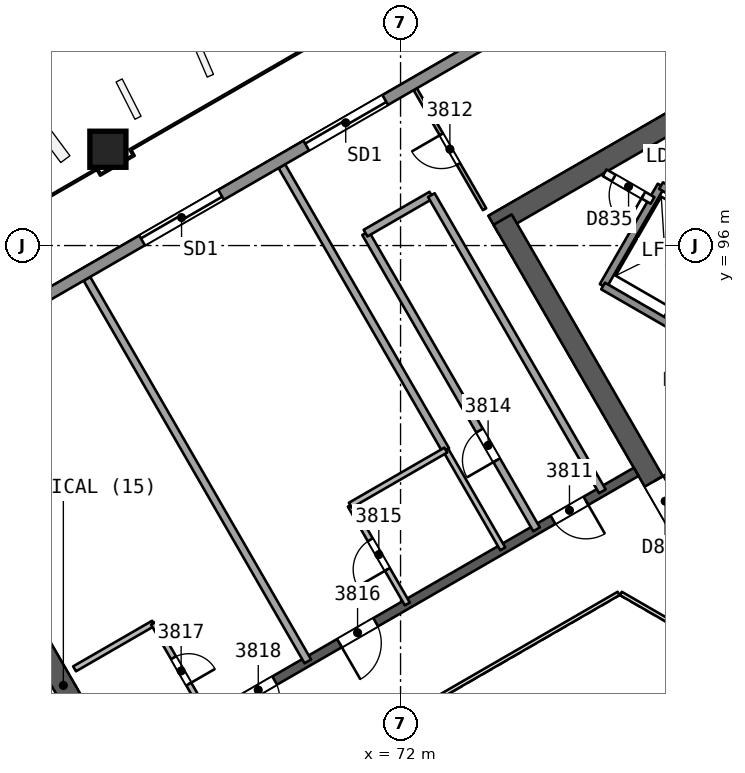
"""IFC4 building model, lengths in metres.
Left out: names, types, materials, properties, quantities, classifications, styles, units other than length and angle.
Written with IfcOpenShell. Run it as: python <this file> out.ifc"""

import sys

from ifc_helpers import new_model, si_unit, direction, frame, frame_2d, origin, origin_2d, place, context, subcontext, project, spatial, rectangle, extrude, element, fill, save


model = new_model("IFC4")
c1 = context("Model", 3, precision=1e-05, world=origin(), true_north=direction((0.0, 1.0)))
c2 = subcontext(c1, "Body", "Model", "MODEL_VIEW")
j1 = project(units=[si_unit("LENGTHUNIT", "METRE"), si_unit("PLANEANGLEUNIT", "RADIAN")], contexts=[c1])
p1 = place(None, origin())
s1 = spatial("IfcSite", under=j1, at=p1, CompositionType="ELEMENT")
p2 = place(p1, origin())
s2 = spatial("IfcBuilding", under=s1, at=p2, CompositionType="ELEMENT")
p3 = place(p2, frame((0.0, 0.0, 160.0)))
s3 = spatial("IfcBuildingStorey", under=s2, at=p3, CompositionType="ELEMENT", Elevation=160.0)
p4 = place(p3, frame((65.682, 80.0, 0.0), z_axis=(0.0, 0.0, 1.0), x_axis=(-0.500000202252, 0.866025287014, 0.0)))
e1 = element("IfcWall", 1, at=p4, inside=s3, PredefinedType="SHEAR", context=c2, shape_type="SweptSolid", body=[
    extrude(rectangle(XDim=10.221, YDim=0.55, at=frame_2d((5.111, 0.0))), origin(), (0.0, 0.0, 1.0), 3.7),
])
p5 = place(p4, frame((0.791, 0.0, 0.0)))
e2 = element("IfcOpeningElement", 2, at=p5, cuts=e1, PredefinedType="OPENING", context=c2, shape_type="SweptSolid", body=[
    extrude(rectangle(XDim=1.2, YDim=2.1, at=frame_2d((0.6, 1.05))), frame((0.0, 0.286, 0.0), z_axis=(0.0, -1.0, 0.0), x_axis=(1.0, 0.0, 0.0)), (0.0, 0.0, 1.0), 0.571),
])
p6 = place(p3, frame((86.723, 103.633, 0.0), z_axis=(0.0, 0.0, 1.0), x_axis=(-0.866023530946, -0.500003243837, 0.0)))
e3 = element("IfcWall", 3, at=p6, inside=s3, PredefinedType="SHEAR", context=c2, shape_type="SweptSolid", body=[
    extrude(rectangle(XDim=14.175, YDim=0.55, at=frame_2d((7.087, 0.0))), origin(), (0.0, 0.0, 1.0), 3.7),
])
p7 = place(p3, frame((74.686, 96.683, 0.0), z_axis=(0.0, 0.0, 1.0), x_axis=(0.499997818338, -0.866026663364, 0.0)))
e4 = element("IfcWall", 4, at=p7, inside=s3, PredefinedType="SHEAR", context=c2, shape_type="SweptSolid", body=[
    extrude(rectangle(XDim=10.105, YDim=0.55, at=frame_2d((5.052, 0.0))), origin(), (0.0, 0.0, 1.0), 3.7),
])
p8 = place(p7, frame((7.955, 0.0, 0.0)))
e5 = element("IfcOpeningElement", 5, at=p8, cuts=e4, PredefinedType="OPENING", context=c2, shape_type="SweptSolid", body=[
    extrude(rectangle(XDim=1.2, YDim=2.1, at=frame_2d((0.6, 1.05))), frame((0.0, 0.286, 0.0), z_axis=(0.0, -1.0, 0.0), x_axis=(1.0, 0.0, 0.0)), (0.0, 0.0, 1.0), 0.571),
])
p9 = place(p3, frame((78.2, 90.046, 0.0), z_axis=(0.0, 0.0, 1.0), x_axis=(-0.866026492143, -0.499998114903, 0.0)))
e6 = element("IfcWall", 6, at=p9, inside=s3, PredefinedType="SHEAR", context=c2, shape_type="SweptSolid", body=[
    extrude(rectangle(XDim=15.588, YDim=0.25, at=frame_2d((7.794, 0.0))), origin(), (0.0, 0.0, 1.0), 3.25),
])
p10 = place(p9, frame((1.527, 0.0, 0.0)))
e7 = element("IfcOpeningElement", 7, at=p10, cuts=e6, PredefinedType="OPENING", context=c2, shape_type="SweptSolid", body=[
    extrude(rectangle(XDim=1.0, YDim=2.1, at=frame_2d((0.5, 1.05))), frame((0.0, 0.135, 0.0), z_axis=(0.0, -1.0, 0.0), x_axis=(1.0, 0.0, 0.0)), (0.0, 0.0, 1.0), 0.271),
])
p11 = place(p9, frame((7.915, 0.0, 0.0)))
e8 = element("IfcOpeningElement", 8, at=p11, cuts=e6, PredefinedType="OPENING", context=c2, shape_type="SweptSolid", body=[
    extrude(rectangle(XDim=1.1, YDim=2.1, at=frame_2d((0.55, 1.05))), frame((0.0, 0.135, 0.0), z_axis=(0.0, -1.0, 0.0), x_axis=(1.0, 0.0, 0.0)), (0.0, 0.0, 1.0), 0.271),
])
p12 = place(p9, frame((10.982, 0.0, 0.0)))
e9 = element("IfcOpeningElement", 9, at=p12, cuts=e6, PredefinedType="OPENING", context=c2, shape_type="SweptSolid", body=[
    extrude(rectangle(XDim=1.0, YDim=2.1, at=frame_2d((0.5, 1.05))), frame((0.0, 0.135, 0.0), z_axis=(0.0, -1.0, 0.0), x_axis=(1.0, 0.0, 0.0)), (0.0, 0.0, 1.0), 0.271),
])
p13 = place(p3, frame((64.287, 98.555, 0.0), z_axis=(0.010093620709, -0.017482414954, 0.999796221231), x_axis=(-0.499897086036, 0.865849517735, 0.020187025824)))
e10 = element("IfcColumn", 10, at=p13, inside=s3, PredefinedType="COLUMN", context=c2, shape_type="SweptSolid", body=[
    extrude(rectangle(XDim=0.95, YDim=0.95, at=origin_2d()), origin(), (0.0, 0.0, 1.0), 3.701),
])
p14 = place(p3, frame((74.21, 96.956, 0.0), z_axis=(0.0, 0.0, 1.0), x_axis=(-0.499983176524, 0.866035116605, 0.0)))
e11 = element("IfcWall", 11, at=p14, inside=s3, PredefinedType="PARTITIONING", context=c2, shape_type="SweptSolid", body=[
    extrude(rectangle(XDim=3.648, YDim=0.1, at=frame_2d((1.824, 0.0))), origin(), (0.0, 0.0, 1.0), 3.25),
])
p15 = place(p14, frame((1.374, 0.0, 0.0)))
e12 = element("IfcOpeningElement", 12, at=p15, cuts=e11, PredefinedType="OPENING", context=c2, shape_type="SweptSolid", body=[
    extrude(rectangle(XDim=0.9, YDim=2.1, at=frame_2d((0.45, 1.05))), frame((0.0, 0.061, 0.0), z_axis=(0.0, -1.0, 0.0), x_axis=(1.0, 0.0, 0.0)), (0.0, 0.0, 1.0), 0.121),
])
p16 = place(p3, frame((75.579, 88.533, 0.0), z_axis=(0.0, 0.0, 1.0), x_axis=(-0.5000018851, 0.866024315419, 0.0)))
e13 = element("IfcWall", 13, at=p16, inside=s3, PredefinedType="PARTITIONING", context=c2, shape_type="SweptSolid", body=[
    extrude(rectangle(XDim=9.0, YDim=0.2, at=frame_2d((4.5, 0.0))), origin(), (0.0, 0.0, 1.0), 3.25),
])
p17 = place(p16, frame((2.1, 0.0, 0.0)))
e14 = element("IfcOpeningElement", 14, at=p17, cuts=e13, PredefinedType="OPENING", context=c2, shape_type="SweptSolid", body=[
    extrude(rectangle(XDim=0.9, YDim=2.1, at=frame_2d((0.45, 1.05))), frame((0.0, 0.11, 0.0), z_axis=(0.0, -1.0, 0.0), x_axis=(1.0, 0.0, 0.0)), (0.0, 0.0, 1.0), 0.221),
])
p18 = place(p3, frame((71.079, 96.327, 0.0), z_axis=(0.0, 0.0, 1.0), x_axis=(0.866041268327, 0.499972520799, 0.0)))
e15 = element("IfcWall", 15, at=p18, inside=s3, PredefinedType="PARTITIONING", context=c2, shape_type="SweptSolid", body=[
    extrude(rectangle(XDim=2.0, YDim=0.2, at=frame_2d((1.0, 0.0))), origin(), (0.0, 0.0, 1.0), 3.25),
])
p19 = place(p3, frame((72.811, 97.327, 0.0), z_axis=(0.0, 0.0, 1.0), x_axis=(0.5000018851, -0.866024315419, 0.0)))
e16 = element("IfcWall", 16, at=p19, inside=s3, PredefinedType="PARTITIONING", context=c2, shape_type="SweptSolid", body=[
    extrude(rectangle(XDim=9.0, YDim=0.2, at=frame_2d((4.5, 0.0))), origin(), (0.0, 0.0, 1.0), 3.25),
])
p20 = place(p3, frame((68.877, 98.088, 0.0), z_axis=(0.0, 0.0, 1.0), x_axis=(0.500001735503, -0.866024401789, 0.0)))
e17 = element("IfcWall", 17, at=p20, inside=s3, PredefinedType="PARTITIONING", context=c2, shape_type="SweptSolid", body=[
    extrude(rectangle(XDim=8.626, YDim=0.2, at=frame_2d((4.313, 0.0))), origin(), (0.0, 0.0, 1.0), 3.25),
])
p21 = place(p3, frame((73.19, 90.617, 0.0), z_axis=(0.0, 0.0, 1.0), x_axis=(0.499990139034, -0.866031096941, 0.0)))
e18 = element("IfcWall", 18, at=p21, inside=s3, PredefinedType="PARTITIONING", context=c2, shape_type="SweptSolid", body=[
    extrude(rectangle(XDim=3.0, YDim=0.15, at=frame_2d((1.5, 0.0))), origin(), (0.0, 0.0, 1.0), 3.25),
])
p22 = place(p3, frame((72.178, 86.569, 0.0), z_axis=(0.0, 0.0, 1.0), x_axis=(-0.499990139034, 0.866031096941, 0.0)))
e19 = element("IfcWall", 19, at=p22, inside=s3, PredefinedType="PARTITIONING", context=c2, shape_type="SweptSolid", body=[
    extrude(rectangle(XDim=3.0, YDim=0.15, at=frame_2d((1.5, 0.0))), origin(), (0.0, 0.0, 1.0), 3.25),
])
p23 = place(p22, frame((1.05, 0.0, 0.0)))
e20 = element("IfcOpeningElement", 20, at=p23, cuts=e19, PredefinedType="OPENING", context=c2, shape_type="SweptSolid", body=[
    extrude(rectangle(XDim=0.9, YDim=2.1, at=frame_2d((0.45, 1.05))), frame((0.0, 0.085, 0.0), z_axis=(0.0, -1.0, 0.0), x_axis=(1.0, 0.0, 0.0)), (0.0, 0.0, 1.0), 0.171),
])
p24 = place(p3, frame((70.678, 89.167, 0.0), z_axis=(0.0, 0.0, 1.0), x_axis=(0.866032775405, 0.499987231761, 0.0)))
e21 = element("IfcWall", 21, at=p24, inside=s3, PredefinedType="PARTITIONING", context=c2, shape_type="SweptSolid", body=[
    extrude(rectangle(XDim=2.9, YDim=0.15, at=frame_2d((1.45, 0.0))), origin(), (0.0, 0.0, 1.0), 3.25),
])
p25 = place(p3, frame((63.747, 95.126, 0.0), z_axis=(0.0, 0.0, 1.0), x_axis=(0.4999987432, -0.866026129397, 0.0)))
e22 = element("IfcWall", 22, at=p25, inside=s3, PredefinedType="PARTITIONING", context=c2, shape_type="SweptSolid", body=[
    extrude(rectangle(XDim=11.626, YDim=0.2, at=frame_2d((5.813, 0.0))), origin(), (0.0, 0.0, 1.0), 3.25),
])
p26 = place(p3, frame((63.422, 84.863, 0.0), z_axis=(0.0, 0.0, 1.0), x_axis=(0.865994240961, 0.500053971709, 0.0)))
e23 = element("IfcWall", 23, at=p26, inside=s3, PredefinedType="PARTITIONING", context=c2, shape_type="SweptSolid", body=[
    extrude(rectangle(XDim=2.401, YDim=0.15, at=frame_2d((1.201, 0.0))), origin(), (0.0, 0.0, 1.0), 3.25),
])
p27 = place(p3, frame((65.502, 86.063, 0.0), z_axis=(0.0, 0.0, 1.0), x_axis=(0.499987231761, -0.866032775405, 0.0)))
e24 = element("IfcWall", 24, at=p27, inside=s3, PredefinedType="PARTITIONING", context=c2, shape_type="SweptSolid", body=[
    extrude(rectangle(XDim=2.9, YDim=0.15, at=frame_2d((1.45, 0.0))), origin(), (0.0, 0.0, 1.0), 3.25),
])
p28 = place(p27, frame((1.05, 0.0, 0.0)))
e25 = element("IfcOpeningElement", 25, at=p28, cuts=e24, PredefinedType="OPENING", context=c2, shape_type="SweptSolid", body=[
    extrude(rectangle(XDim=0.8, YDim=2.1, at=frame_2d((0.4, 1.05))), frame((0.0, 0.085, 0.0), z_axis=(0.0, -1.0, 0.0), x_axis=(1.0, 0.0, 0.0)), (0.0, 0.0, 1.0), 0.171),
])
p29 = place(p3, frame((42.059, 82.777, 0.0), z_axis=(0.0, 0.0, 1.0), x_axis=(0.866025745652, 0.499999407868, 0.0)))
e26 = element("IfcWall", 26, at=p29, inside=s3, PredefinedType="SOLIDWALL", context=c2, shape_type="SweptSolid", body=[
    extrude(rectangle(XDim=54.279, YDim=0.3, at=frame_2d((27.14, 0.0))), origin(), (0.0, 0.0, 1.0), 3.25),
])
p30 = place(p29, frame((26.719, 0.0, 0.0)))
e27 = element("IfcOpeningElement", 27, at=p30, cuts=e26, PredefinedType="OPENING", context=c2, shape_type="SweptSolid", body=[
    extrude(rectangle(XDim=2.4, YDim=2.4, at=frame_2d((1.2, 1.2))), frame((0.0, 0.161, 0.0), z_axis=(0.0, -1.0, 0.0), x_axis=(1.0, 0.0, 0.0)), (0.0, 0.0, 1.0), 0.321),
])
p31 = place(p29, frame((31.708, 0.0, 0.0)))
e28 = element("IfcOpeningElement", 28, at=p31, cuts=e26, PredefinedType="OPENING", context=c2, shape_type="SweptSolid", body=[
    extrude(rectangle(XDim=2.4, YDim=2.4, at=frame_2d((1.2, 1.2))), frame((0.0, 0.161, 0.0), z_axis=(0.0, -1.0, 0.0), x_axis=(1.0, 0.0, 0.0)), (0.0, 0.0, 1.0), 0.321),
])
p32 = place(p29, frame((42.175, 0.0, 0.0)))
e29 = element("IfcOpeningElement", 29, at=p32, cuts=e26, PredefinedType="OPENING", context=c2, shape_type="SweptSolid", body=[
    extrude(rectangle(XDim=2.4, YDim=2.4, at=frame_2d((1.2, 1.2))), frame((0.0, 0.161, 0.0), z_axis=(0.0, -1.0, 0.0), x_axis=(1.0, 0.0, 0.0)), (0.0, 0.0, 1.0), 0.321),
])
p33 = place(p29, frame((11.235, 0.0, 0.0)))
e30 = element("IfcOpeningElement", 30, at=p33, cuts=e26, PredefinedType="OPENING", context=c2, shape_type="SweptSolid", body=[
    extrude(rectangle(XDim=2.4, YDim=2.4, at=frame_2d((1.2, 1.2))), frame((0.0, 0.161, 0.0), z_axis=(0.0, -1.0, 0.0), x_axis=(1.0, 0.0, 0.0)), (0.0, 0.0, 1.0), 0.321),
])
for number, where, z_axis, x_axis in (
    (31, (78.976, 93.986, 0.0), (0.0, 0.0, 1.0), (0.5, 0.866, 0.0)),
    (32, (77.33, 94.936, 0.0), (0.0, 0.0, 1.0), (0.5, 0.866, 0.0)),
):
    element("IfcWall", number, at=place(p3, frame(where, z_axis=z_axis, x_axis=x_axis)), inside=s3, PredefinedType="SOLIDWALL", context=c2, shape_type="SweptSolid", body=[
        extrude(rectangle(XDim=3.05, YDim=0.2, at=frame_2d((1.525, 0.0))), origin(), (0.0, 0.0, 1.0), 3.25),
    ])
p34 = place(p3, frame((86.77, 89.486, 0.0), z_axis=(0.0, 0.0, 1.0), x_axis=(-0.86601811187, 0.500012629753, 0.0)))
e33 = element("IfcWall", 33, at=p34, inside=s3, PredefinedType="SOLIDWALL", context=c2, shape_type="SweptSolid", body=[
    extrude(rectangle(XDim=10.9, YDim=0.2, at=frame_2d((5.45, 0.0))), origin(), (0.0, 0.0, 1.0), 3.25),
])
p35 = place(p34, frame((0.575, 0.0, 0.0)))
e34 = element("IfcOpeningElement", 34, at=p35, cuts=e33, PredefinedType="OPENING", context=c2, shape_type="SweptSolid", body=[
    extrude(rectangle(XDim=1.1, YDim=2.1, at=frame_2d((0.55, 1.05))), frame((0.0, 0.11, 0.0), z_axis=(0.0, -1.0, 0.0), x_axis=(1.0, 0.0, 0.0)), (0.0, 0.0, 1.0), 0.221),
])
p36 = place(p34, frame((2.825, 0.0, 0.0)))
e35 = element("IfcOpeningElement", 35, at=p36, cuts=e33, PredefinedType="OPENING", context=c2, shape_type="SweptSolid", body=[
    extrude(rectangle(XDim=1.1, YDim=2.1, at=frame_2d((0.55, 1.05))), frame((0.0, 0.11, 0.0), z_axis=(0.0, -1.0, 0.0), x_axis=(1.0, 0.0, 0.0)), (0.0, 0.0, 1.0), 0.221),
])
p37 = place(p34, frame((5.075, 0.0, 0.0)))
e36 = element("IfcOpeningElement", 36, at=p37, cuts=e33, PredefinedType="OPENING", context=c2, shape_type="SweptSolid", body=[
    extrude(rectangle(XDim=1.1, YDim=2.1, at=frame_2d((0.55, 1.05))), frame((0.0, 0.11, 0.0), z_axis=(0.0, -1.0, 0.0), x_axis=(1.0, 0.0, 0.0)), (0.0, 0.0, 1.0), 0.221),
])
p38 = place(p34, frame((7.325, 0.0, 0.0)))
e37 = element("IfcOpeningElement", 37, at=p38, cuts=e33, PredefinedType="OPENING", context=c2, shape_type="SweptSolid", body=[
    extrude(rectangle(XDim=1.1, YDim=2.1, at=frame_2d((0.55, 1.05))), frame((0.0, 0.11, 0.0), z_axis=(0.0, -1.0, 0.0), x_axis=(1.0, 0.0, 0.0)), (0.0, 0.0, 1.0), 0.221),
])
p39 = place(p3, frame((78.63, 97.188, 0.0), z_axis=(0.0, 0.0, 1.0), x_axis=(-0.866003949776, 0.500037157592, 0.0)))
e38 = element("IfcWall", 38, at=p39, inside=s3, PredefinedType="PARTITIONING", context=c2, shape_type="SweptSolid", body=[
    extrude(rectangle(XDim=1.455, YDim=0.2, at=frame_2d((0.728, 0.0))), origin(), (0.0, 0.0, 1.0), 3.25),
])
p40 = place(p39, frame((0.278, 0.0, 0.0)))
e39 = element("IfcOpeningElement", 39, at=p40, cuts=e38, PredefinedType="OPENING", context=c2, shape_type="SweptSolid", body=[
    extrude(rectangle(XDim=0.9, YDim=2.1, at=frame_2d((0.45, 1.05))), frame((0.0, 0.11, 0.0), z_axis=(0.0, -1.0, 0.0), x_axis=(1.0, 0.0, 0.0)), (0.0, 0.0, 1.0), 0.221),
])
p41 = place(p3, frame((80.5, 96.627, 0.0), z_axis=(0.0, 0.0, 1.0), x_axis=(-0.86601224135, 0.500022797313, 0.0)))
e40 = element("IfcWall", 40, at=p41, inside=s3, PredefinedType="SOLIDWALL", context=c2, shape_type="SweptSolid", body=[
    extrude(rectangle(XDim=1.9, YDim=0.2, at=frame_2d((0.95, 0.0))), origin(), (0.0, 0.0, 1.0), 3.25),
])
p42 = place(p41, frame((0.4, 0.0, 0.0)))
e41 = element("IfcOpeningElement", 41, at=p42, cuts=e40, PredefinedType="OPENING", context=c2, shape_type="SweptSolid", body=[
    extrude(rectangle(XDim=1.1, YDim=2.1, at=frame_2d((0.55, 1.05))), frame((0.0, 0.11, 0.0), z_axis=(0.0, -1.0, 0.0), x_axis=(1.0, 0.0, 0.0)), (0.0, 0.0, 1.0), 0.221),
])
p43 = place(p3, frame((79.53, 85.846, 0.0), z_axis=(0.0, 0.0, 1.0), x_axis=(-0.866041268327, 0.499972520799, 0.0)))
e42 = element("IfcWall", 42, at=p43, inside=s3, PredefinedType="PARTITIONING", context=c2, shape_type="SweptSolid", body=[
    extrude(rectangle(XDim=2.0, YDim=0.1, at=frame_2d((1.0, 0.0))), origin(), (0.0, 0.0, 1.0), 3.25),
])
p44 = place(p3, frame((77.738, 86.846, 0.0), z_axis=(0.0, 0.0, 1.0), x_axis=(-0.866026658274, -0.499997827154, 0.0)))
e43 = element("IfcWall", 43, at=p44, inside=s3, PredefinedType="PARTITIONING", context=c2, shape_type="SweptSolid", body=[
    extrude(rectangle(XDim=11.588, YDim=0.1, at=frame_2d((5.794, 0.0))), origin(), (0.0, 0.0, 1.0), 3.25),
])
p45 = place(p10, origin())
e44 = element("IfcDoor", 44, at=p45, inside=s3, OperationType="SINGLE_SWING_LEFT", PredefinedType="NOTDEFINED", context=c2, shape_type="SweptSolid", body=[
    extrude(rectangle(XDim=1.0, YDim=2.1, at=frame_2d((0.5, 1.05))), frame((0.0, 0.025, 0.0), z_axis=(0.0, -1.0, 0.0), x_axis=(1.0, 0.0, 0.0)), (0.0, 0.0, 1.0), 0.05),
])
fill(e7, e44)
p46 = place(p15, origin())
e45 = element("IfcDoor", 45, at=p46, inside=s3, OperationType="SINGLE_SWING_RIGHT", PredefinedType="NOTDEFINED", context=c2, shape_type="SweptSolid", body=[
    extrude(rectangle(XDim=0.9, YDim=2.1, at=frame_2d((0.45, 1.05))), frame((0.0, 0.025, 0.0), z_axis=(0.0, -1.0, 0.0), x_axis=(1.0, 0.0, 0.0)), (0.0, 0.0, 1.0), 0.05),
])
fill(e12, e45)
p47 = place(p17, origin())
e46 = element("IfcDoor", 46, at=p47, inside=s3, OperationType="SINGLE_SWING_LEFT", PredefinedType="NOTDEFINED", context=c2, shape_type="SweptSolid", body=[
    extrude(rectangle(XDim=0.9, YDim=2.1, at=frame_2d((0.45, 1.05))), frame((0.0, 0.025, 0.0), z_axis=(0.0, -1.0, 0.0), x_axis=(1.0, 0.0, 0.0)), (0.0, 0.0, 1.0), 0.05),
])
fill(e14, e46)
p48 = place(p23, origin())
e47 = element("IfcDoor", 47, at=p48, inside=s3, OperationType="SINGLE_SWING_LEFT", PredefinedType="NOTDEFINED", context=c2, shape_type="SweptSolid", body=[
    extrude(rectangle(XDim=0.9, YDim=2.1, at=frame_2d((0.45, 1.05))), frame((0.0, 0.025, 0.0), z_axis=(0.0, -1.0, 0.0), x_axis=(1.0, 0.0, 0.0)), (0.0, 0.0, 1.0), 0.05),
])
fill(e20, e47)
p49 = place(p11, origin())
e48 = element("IfcDoor", 48, at=p49, inside=s3, OperationType="SINGLE_SWING_RIGHT", PredefinedType="NOTDEFINED", context=c2, shape_type="SweptSolid", body=[
    extrude(rectangle(XDim=1.1, YDim=2.1, at=frame_2d((0.55, 1.05))), frame((0.0, 0.025, 0.0), z_axis=(0.0, -1.0, 0.0), x_axis=(1.0, 0.0, 0.0)), (0.0, 0.0, 1.0), 0.05),
])
fill(e8, e48)
p50 = place(p28, origin())
e49 = element("IfcDoor", 49, at=p50, inside=s3, OperationType="SINGLE_SWING_RIGHT", PredefinedType="NOTDEFINED", context=c2, shape_type="SweptSolid", body=[
    extrude(rectangle(XDim=0.8, YDim=2.1, at=frame_2d((0.4, 1.05))), frame((0.0, 0.025, 0.0), z_axis=(0.0, -1.0, 0.0), x_axis=(1.0, 0.0, 0.0)), (0.0, 0.0, 1.0), 0.05),
])
fill(e25, e49)
p51 = place(p12, origin())
e50 = element("IfcDoor", 50, at=p51, inside=s3, OperationType="SINGLE_SWING_RIGHT", PredefinedType="NOTDEFINED", context=c2, shape_type="SweptSolid", body=[
    extrude(rectangle(XDim=1.0, YDim=2.1, at=frame_2d((0.5, 1.05))), frame((0.0, 0.025, 0.0), z_axis=(0.0, -1.0, 0.0), x_axis=(1.0, 0.0, 0.0)), (0.0, 0.0, 1.0), 0.05),
])
fill(e9, e50)
p52 = place(p30, origin())
e51 = element("IfcDoor", 51, at=p52, inside=s3, OperationType="SLIDING_TO_LEFT", PredefinedType="NOTDEFINED", context=c2, shape_type="SweptSolid", body=[
    extrude(rectangle(XDim=2.4, YDim=2.4, at=frame_2d((1.2, 1.2))), frame((0.0, 0.025, 0.0), z_axis=(0.0, -1.0, 0.0), x_axis=(1.0, 0.0, 0.0)), (0.0, 0.0, 1.0), 0.05),
])
fill(e27, e51)
p53 = place(p31, origin())
e52 = element("IfcDoor", 52, at=p53, inside=s3, OperationType="SLIDING_TO_RIGHT", PredefinedType="NOTDEFINED", context=c2, shape_type="SweptSolid", body=[
    extrude(rectangle(XDim=2.4, YDim=2.4, at=frame_2d((1.2, 1.2))), frame((0.0, 0.025, 0.0), z_axis=(0.0, -1.0, 0.0), x_axis=(1.0, 0.0, 0.0)), (0.0, 0.0, 1.0), 0.05),
])
fill(e28, e52)
p54 = place(p8, origin())
e53 = element("IfcDoor", 53, at=p54, inside=s3, OperationType="SINGLE_SWING_LEFT", PredefinedType="NOTDEFINED", context=c2, shape_type="SweptSolid", body=[
    extrude(rectangle(XDim=1.2, YDim=2.1, at=frame_2d((0.6, 1.05))), frame((0.0, 0.025, 0.0), z_axis=(0.0, -1.0, 0.0), x_axis=(1.0, 0.0, 0.0)), (0.0, 0.0, 1.0), 0.05),
])
fill(e5, e53)
p55 = place(p40, origin())
e54 = element("IfcDoor", 54, at=p55, inside=s3, OperationType="SINGLE_SWING_LEFT", PredefinedType="NOTDEFINED", context=c2, shape_type="SweptSolid", body=[
    extrude(rectangle(XDim=0.9, YDim=2.1, at=frame_2d((0.45, 1.05))), frame((0.0, 0.025, 0.0), z_axis=(0.0, -1.0, 0.0), x_axis=(1.0, 0.0, 0.0)), (0.0, 0.0, 1.0), 0.05),
])
fill(e39, e54)
save(model, sys.argv[1])
